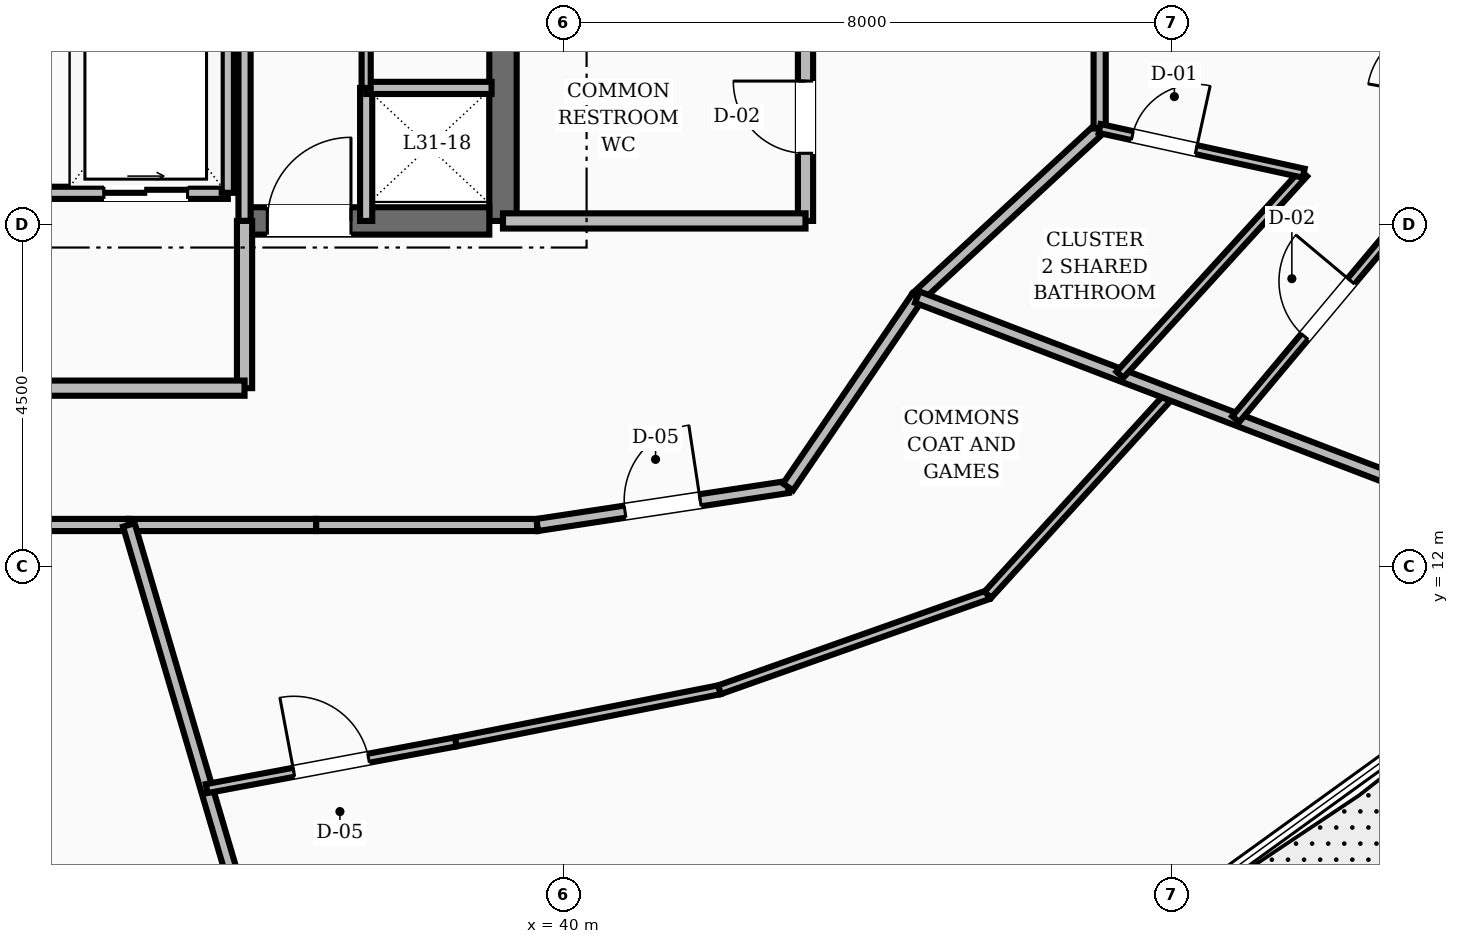
"""IFC4 building model, lengths in metres.
Left out: names, types, materials, properties, quantities, classifications, styles, units other than length and angle.
Written with IfcOpenShell. Run it as: python <this file> out.ifc"""

import sys

from ifc_helpers import new_model, si_unit, direction, frame, frame_2d, origin, place, context, subcontext, project, spatial, rectangle, extrude, element, fill, save


model = new_model("IFC4")
c1 = context("Model", 3, precision=1e-05, world=origin(), true_north=direction((0.0, 1.0)))
c2 = subcontext(c1, "Body", "Model", "MODEL_VIEW")
j1 = project(units=[si_unit("LENGTHUNIT", "METRE"), si_unit("PLANEANGLEUNIT", "RADIAN")], contexts=[c1])
p1 = place(None, origin())
s1 = spatial("IfcSite", under=j1, at=p1, CompositionType="ELEMENT")
p2 = place(p1, origin())
s2 = spatial("IfcBuilding", under=s1, at=p2, CompositionType="ELEMENT")
p3 = place(p2, frame((0.0, 0.0, 124.4)))
s3 = spatial("IfcBuildingStorey", under=s2, at=p3, CompositionType="ELEMENT", Elevation=124.4)
p4 = place(p3, frame((39.2, 16.55, 0.0), z_axis=(0.0, 0.0, 1.0), x_axis=(0.0, 1.0, 0.0)))
e1 = element("IfcWall", 1, at=p4, inside=s3, PredefinedType="SHEAR", context=c2, shape_type="SweptSolid", body=[
    extrude(rectangle(XDim=6.3, YDim=0.36, at=frame_2d((3.15, 0.0))), origin(), (0.0, 0.0, 1.0), 3.6),
])
p5 = place(p3, frame((35.8, 16.55, 0.0), z_axis=(0.0, 0.0, 1.0), x_axis=(1.0, 0.0, 0.0)))
e2 = element("IfcWall", 2, at=p5, inside=s3, PredefinedType="SHEAR", context=c2, shape_type="SweptSolid", body=[
    extrude(rectangle(XDim=3.22, YDim=0.36, at=frame_2d((1.61, 0.0))), origin(), (0.0, 0.0, 1.0), 3.6),
])
p6 = place(p5, frame((0.3, 0.0, 0.0)))
e3 = element("IfcOpeningElement", 3, at=p6, cuts=e2, PredefinedType="OPENING", context=c2, shape_type="SweptSolid", body=[
    extrude(rectangle(XDim=1.1, YDim=2.1, at=frame_2d((0.55, 1.05))), frame((0.0, 0.19, 0.0), z_axis=(0.0, -1.0, 0.0), x_axis=(1.0, 0.0, 0.0)), (0.0, 0.0, 1.0), 0.38),
])
p7 = place(p3, frame((43.18, 16.55, 0.0), z_axis=(0.0, 0.0, 1.0), x_axis=(0.0, 1.0, 0.0)))
e4 = element("IfcWall", 4, at=p7, inside=s3, PredefinedType="SOLIDWALL", context=c2, shape_type="SweptSolid", body=[
    extrude(rectangle(XDim=2.73, YDim=0.2, at=frame_2d((1.365, 0.0))), origin(), (0.0, 0.0, 1.0), 2.8),
])
p8 = place(p7, frame((0.89, 0.0, 0.0)))
e5 = element("IfcOpeningElement", 5, at=p8, cuts=e4, PredefinedType="OPENING", context=c2, shape_type="SweptSolid", body=[
    extrude(rectangle(XDim=0.95, YDim=2.1, at=frame_2d((0.475, 1.05))), frame((0.0, 0.11, 0.0), z_axis=(0.0, -1.0, 0.0), x_axis=(1.0, 0.0, 0.0)), (0.0, 0.0, 1.0), 0.22),
])
p9 = place(p3, frame((39.2, 16.55, 0.0), z_axis=(0.0, 0.0, 1.0), x_axis=(1.0, 0.0, 0.0)))
e6 = element("IfcWall", 6, at=p9, inside=s3, PredefinedType="SOLIDWALL", context=c2, shape_type="SweptSolid", body=[
    extrude(rectangle(XDim=3.98, YDim=0.2, at=frame_2d((1.99, 0.0))), origin(), (0.0, 0.0, 1.0), 2.8),
])
p10 = place(p3, frame((35.8, 16.55, 0.0), z_axis=(0.0, 0.0, 1.0), x_axis=(0.0, 1.0, 0.0)))
e7 = element("IfcWall", 7, at=p10, inside=s3, PredefinedType="SOLIDWALL", context=c2, shape_type="SweptSolid", body=[
    extrude(rectangle(XDim=3.3, YDim=0.16, at=frame_2d((1.65, 0.0))), origin(), (0.0, 0.0, 1.0), 2.8),
])
p11 = place(p3, frame((37.4, 16.55, 0.0), z_axis=(0.0, 0.0, 1.0), x_axis=(0.0, 1.0, 0.0)))
e8 = element("IfcWall", 8, at=p11, inside=s3, PredefinedType="SOLIDWALL", context=c2, shape_type="SweptSolid", body=[
    extrude(rectangle(XDim=1.75, YDim=0.16, at=frame_2d((0.875, 0.0))), origin(), (0.0, 0.0, 1.0), 2.8),
])
p12 = place(p3, frame((35.8, 14.35, 0.0), z_axis=(0.0, 0.0, 1.0), x_axis=(0.0, 1.0, 0.0)))
e9 = element("IfcWall", 9, at=p12, inside=s3, PredefinedType="SOLIDWALL", context=c2, shape_type="SweptSolid", body=[
    extrude(rectangle(XDim=2.2, YDim=0.2, at=frame_2d((1.1, 0.0))), origin(), (0.0, 0.0, 1.0), 2.8),
])
p13 = place(p3, frame((28.2, 14.35, 0.0), z_axis=(0.0, 0.0, 1.0), x_axis=(1.0, 0.0, 0.0)))
e10 = element("IfcWall", 10, at=p13, inside=s3, PredefinedType="SOLIDWALL", context=c2, shape_type="SweptSolid", body=[
    extrude(rectangle(XDim=7.6, YDim=0.2, at=frame_2d((3.8, 0.0))), origin(), (0.0, 0.0, 1.0), 2.8),
])
p14 = place(p13, frame((3.2, 0.0, 0.0)))
e11 = element("IfcOpeningElement", 11, at=p14, cuts=e10, PredefinedType="OPENING", context=c2, shape_type="SweptSolid", body=[
    extrude(rectangle(XDim=1.2, YDim=2.1, at=frame_2d((0.6, 1.05))), frame((0.0, 0.11, 0.0), z_axis=(0.0, -1.0, 0.0), x_axis=(1.0, 0.0, 0.0)), (0.0, 0.0, 1.0), 0.22),
])
p15 = place(p3, frame((28.42, 16.92, 0.0), z_axis=(0.0, 0.0, 1.0), x_axis=(1.0, 0.0, 0.0)))
e12 = element("IfcWall", 12, at=p15, inside=s3, PredefinedType="SOLIDWALL", context=c2, shape_type="SweptSolid", body=[
    extrude(rectangle(XDim=7.16, YDim=0.16, at=frame_2d((3.58, 0.0))), origin(), (0.0, 0.0, 1.0), 2.8),
])
p16 = place(p15, frame((0.53, 0.0, 0.0)))
e13 = element("IfcOpeningElement", 13, at=p16, cuts=e12, PredefinedType="OPENING", context=c2, shape_type="SweptSolid", body=[
    extrude(rectangle(XDim=1.1, YDim=2.15, at=frame_2d((0.55, 1.075))), frame((0.0, 0.09, 0.0), z_axis=(0.0, -1.0, 0.0), x_axis=(1.0, 0.0, 0.0)), (0.0, 0.0, 1.0), 0.18),
])
p17 = place(p15, frame((3.03, 0.0, 0.0)))
e14 = element("IfcOpeningElement", 14, at=p17, cuts=e12, PredefinedType="OPENING", context=c2, shape_type="SweptSolid", body=[
    extrude(rectangle(XDim=1.1, YDim=2.15, at=frame_2d((0.55, 1.075))), frame((0.0, 0.09, 0.0), z_axis=(0.0, -1.0, 0.0), x_axis=(1.0, 0.0, 0.0)), (0.0, 0.0, 1.0), 0.18),
])
p18 = place(p15, frame((5.53, 0.0, 0.0)))
e15 = element("IfcOpeningElement", 15, at=p18, cuts=e12, PredefinedType="OPENING", context=c2, shape_type="SweptSolid", body=[
    extrude(rectangle(XDim=1.1, YDim=2.15, at=frame_2d((0.55, 1.075))), frame((0.0, 0.09, 0.0), z_axis=(0.0, -1.0, 0.0), x_axis=(1.0, 0.0, 0.0)), (0.0, 0.0, 1.0), 0.18),
])
p19 = place(p3, frame((35.58, 16.92, 0.0), z_axis=(0.0, 0.0, 1.0), x_axis=(0.0, 1.0, 0.0)))
e16 = element("IfcWall", 16, at=p19, inside=s3, PredefinedType="SOLIDWALL", context=c2, shape_type="SweptSolid", body=[
    extrude(rectangle(XDim=2.76, YDim=0.16, at=frame_2d((1.38, 0.0))), origin(), (0.0, 0.0, 1.0), 2.8),
])
p20 = place(p3, frame((37.4, 18.3, 0.0), z_axis=(0.0, 0.0, 1.0), x_axis=(1.0, 0.0, 0.0)))
e17 = element("IfcWall", 17, at=p20, inside=s3, PredefinedType="SOLIDWALL", context=c2, shape_type="SweptSolid", body=[
    extrude(rectangle(XDim=1.65, YDim=0.16, at=frame_2d((0.825, 0.0))), origin(), (0.0, 0.0, 1.0), 2.8),
])
p21 = place(p3, frame((37.4, 18.3, 0.0), z_axis=(0.0, 0.0, 1.0), x_axis=(0.0, 1.0, 0.0)))
e18 = element("IfcWall", 18, at=p21, inside=s3, PredefinedType="PARTITIONING", context=c2, shape_type="SweptSolid", body=[
    extrude(rectangle(XDim=4.45, YDim=0.12, at=frame_2d((2.225, 0.0))), origin(), (0.0, 0.0, 1.0), 2.8),
])
p22 = place(p21, frame((1.75, 0.0, 0.0)))
e19 = element("IfcOpeningElement", 19, at=p22, cuts=e18, PredefinedType="OPENING", context=c2, shape_type="SweptSolid", body=[
    extrude(rectangle(XDim=0.95, YDim=2.1, at=frame_2d((0.475, 1.05))), frame((0.0, 0.07, 0.0), z_axis=(0.0, -1.0, 0.0), x_axis=(1.0, 0.0, 0.0)), (0.0, 0.0, 1.0), 0.14),
])
p23 = place(p3, frame((32.0, 12.55, 0.0), z_axis=(0.0, 0.0, 1.0), x_axis=(1.0, 0.0, 0.0)))
e20 = element("IfcWall", 20, at=p23, inside=s3, PredefinedType="SOLIDWALL", context=c2, shape_type="SweptSolid", body=[
    extrude(rectangle(XDim=2.278, YDim=0.16, at=frame_2d((1.139, 0.0))), origin(), (0.0, 0.0, 1.0), 2.8),
])
p24 = place(p3, frame((34.278, 12.55, 0.0), z_axis=(0.0, 0.0, 1.0), x_axis=(1.0, 0.0, 0.0)))
e21 = element("IfcWall", 21, at=p24, inside=s3, PredefinedType="SOLIDWALL", context=c2, shape_type="SweptSolid", body=[
    extrude(rectangle(XDim=2.465, YDim=0.16, at=frame_2d((1.232, 0.0))), origin(), (0.0, 0.0, 1.0), 2.8),
])
p25 = place(p3, frame((36.743, 12.55, 0.0), z_axis=(0.0, 0.0, 1.0), x_axis=(1.0, 0.0, 0.0)))
e22 = element("IfcWall", 22, at=p25, inside=s3, PredefinedType="SOLIDWALL", context=c2, shape_type="SweptSolid", body=[
    extrude(rectangle(XDim=2.908, YDim=0.16, at=frame_2d((1.454, 0.0))), origin(), (0.0, 0.0, 1.0), 2.8),
])
p26 = place(p3, frame((39.651, 12.55, 0.0), z_axis=(0.0, 0.0, 1.0), x_axis=(0.988710906508, 0.149835721217, 0.0)))
e23 = element("IfcWall", 23, at=p26, inside=s3, PredefinedType="SOLIDWALL", context=c2, shape_type="SweptSolid", body=[
    extrude(rectangle(XDim=3.337, YDim=0.16, at=frame_2d((1.668, 0.0))), origin(), (0.0, 0.0, 1.0), 2.8),
])
p27 = place(p26, frame((1.168, 0.0, 0.0)))
e24 = element("IfcOpeningElement", 24, at=p27, cuts=e23, PredefinedType="OPENING", context=c2, shape_type="SweptSolid", body=[
    extrude(rectangle(XDim=1.0, YDim=2.1, at=frame_2d((0.5, 1.05))), frame((0.0, 0.09, 0.0), z_axis=(0.0, -1.0, 0.0), x_axis=(1.0, 0.0, 0.0)), (0.0, 0.0, 1.0), 0.18),
])
p28 = place(p3, frame((42.95, 13.05, 0.0), z_axis=(0.0, 0.0, 1.0), x_axis=(0.562674669208, 0.826678423955, 0.0)))
e25 = element("IfcWall", 25, at=p28, inside=s3, PredefinedType="SOLIDWALL", context=c2, shape_type="SweptSolid", body=[
    extrude(rectangle(XDim=3.021, YDim=0.16, at=frame_2d((1.511, 0.0))), origin(), (0.0, 0.0, 1.0), 2.8),
])
p29 = place(p3, frame((44.65, 15.548, 0.0), z_axis=(0.0, 0.0, 1.0), x_axis=(0.734347936521, 0.678773237633, 0.0)))
e26 = element("IfcWall", 26, at=p29, inside=s3, PredefinedType="SOLIDWALL", context=c2, shape_type="SweptSolid", body=[
    extrude(rectangle(XDim=3.268, YDim=0.16, at=frame_2d((1.634, 0.0))), origin(), (0.0, 0.0, 1.0), 2.8),
])
p30 = place(p3, frame((47.05, 17.766, 0.0), z_axis=(0.0, 0.0, 1.0), x_axis=(0.0, 1.0, 0.0)))
e27 = element("IfcWall", 27, at=p30, inside=s3, PredefinedType="SOLIDWALL", context=c2, shape_type="SweptSolid", body=[
    extrude(rectangle(XDim=3.24, YDim=0.16, at=frame_2d((1.62, 0.0))), origin(), (0.0, 0.0, 1.0), 2.8),
])
p31 = place(p30, frame((1.12, 0.0, 0.0)))
e28 = element("IfcOpeningElement", 28, at=p31, cuts=e27, PredefinedType="OPENING", context=c2, shape_type="SweptSolid", body=[
    extrude(rectangle(XDim=1.0, YDim=2.1, at=frame_2d((0.5, 1.05))), frame((0.0, 0.09, 0.0), z_axis=(0.0, -1.0, 0.0), x_axis=(1.0, 0.0, 0.0)), (0.0, 0.0, 1.0), 0.18),
])
p32 = place(p3, frame((34.278, 12.55, 0.0), z_axis=(0.0, 0.0, 1.0), x_axis=(0.283064731291, -0.959100806954, 0.0)))
e29 = element("IfcWall", 29, at=p32, inside=s3, PredefinedType="SOLIDWALL", context=c2, shape_type="SweptSolid", body=[
    extrude(rectangle(XDim=10.283, YDim=0.16, at=frame_2d((5.141, 0.0))), origin(), (0.0, 0.0, 1.0), 2.8),
])
p33 = place(p3, frame((35.301, 9.082, 0.0), z_axis=(0.0, 0.0, 1.0), x_axis=(0.982868872263, 0.184306212419, 0.0)))
e30 = element("IfcWall", 30, at=p33, inside=s3, PredefinedType="PARTITIONING", context=c2, shape_type="SweptSolid", body=[
    extrude(rectangle(XDim=3.335, YDim=0.12, at=frame_2d((1.668, 0.0))), origin(), (0.0, 0.0, 1.0), 2.8),
])
p34 = place(p33, frame((1.168, 0.0, 0.0)))
e31 = element("IfcOpeningElement", 31, at=p34, cuts=e30, PredefinedType="OPENING", context=c2, shape_type="SweptSolid", body=[
    extrude(rectangle(XDim=1.0, YDim=2.1, at=frame_2d((0.5, 1.05))), frame((0.0, 0.07, 0.0), z_axis=(0.0, -1.0, 0.0), x_axis=(1.0, 0.0, 0.0)), (0.0, 0.0, 1.0), 0.14),
])
p35 = place(p3, frame((38.58, 9.696, 0.0), z_axis=(0.0, 0.0, 1.0), x_axis=(0.980995270945, 0.19403164274, 0.0)))
e32 = element("IfcWall", 32, at=p35, inside=s3, PredefinedType="PARTITIONING", context=c2, shape_type="SweptSolid", body=[
    extrude(rectangle(XDim=3.537, YDim=0.12, at=frame_2d((1.769, 0.0))), origin(), (0.0, 0.0, 1.0), 2.8),
])
p36 = place(p3, frame((42.049, 10.383, 0.0), z_axis=(0.0, 0.0, 1.0), x_axis=(0.942746880335, 0.333509099753, 0.0)))
e33 = element("IfcWall", 33, at=p36, inside=s3, PredefinedType="PARTITIONING", context=c2, shape_type="SweptSolid", body=[
    extrude(rectangle(XDim=3.744, YDim=0.12, at=frame_2d((1.872, 0.0))), origin(), (0.0, 0.0, 1.0), 2.8),
])
p37 = place(p3, frame((45.579, 11.631, 0.0), z_axis=(0.0, 0.0, 1.0), x_axis=(0.673346353961, 0.739327185762, 0.0)))
e34 = element("IfcWall", 34, at=p37, inside=s3, PredefinedType="PARTITIONING", context=c2, shape_type="SweptSolid", body=[
    extrude(rectangle(XDim=3.571, YDim=0.12, at=frame_2d((1.785, 0.0))), origin(), (0.0, 0.0, 1.0), 2.8),
])
p38 = place(p3, frame((44.65, 15.548, 0.0), z_axis=(0.0, 0.0, 1.0), x_axis=(0.933853161124, -0.35765664185, 0.0)))
e35 = element("IfcWall", 35, at=p38, inside=s3, PredefinedType="SOLIDWALL", context=c2, shape_type="SweptSolid", body=[
    extrude(rectangle(XDim=10.147, YDim=0.16, at=frame_2d((5.073, 0.0))), origin(), (0.0, 0.0, 1.0), 2.8),
])
p39 = place(p3, frame((47.316, 14.526, 0.0), z_axis=(0.0, 0.0, 1.0), x_axis=(0.673803025367, 0.738911011562, 0.0)))
e36 = element("IfcWall", 36, at=p39, inside=s3, PredefinedType="PARTITIONING", context=c2, shape_type="SweptSolid", body=[
    extrude(rectangle(XDim=3.589, YDim=0.12, at=frame_2d((1.794, 0.0))), origin(), (0.0, 0.0, 1.0), 2.8),
])
p40 = place(p3, frame((47.05, 17.766, 0.0), z_axis=(0.0, 0.0, 1.0), x_axis=(0.976828673368, -0.214022762541, 0.0)))
e37 = element("IfcWall", 37, at=p40, inside=s3, PredefinedType="PARTITIONING", context=c2, shape_type="SweptSolid", body=[
    extrude(rectangle(XDim=2.748, YDim=0.12, at=frame_2d((1.374, 0.0))), origin(), (0.0, 0.0, 1.0), 2.8),
])
p41 = place(p40, frame((0.44, 0.0, 0.0)))
e38 = element("IfcOpeningElement", 38, at=p41, cuts=e37, PredefinedType="OPENING", context=c2, shape_type="SweptSolid", body=[
    extrude(rectangle(XDim=0.86, YDim=2.1, at=frame_2d((0.43, 1.05))), frame((0.0, 0.07, 0.0), z_axis=(0.0, -1.0, 0.0), x_axis=(1.0, 0.0, 0.0)), (0.0, 0.0, 1.0), 0.14),
])
p42 = place(p3, frame((48.84, 13.943, 0.0), z_axis=(0.0, 0.0, 1.0), x_axis=(0.64212553746, 0.766599500483, 0.0)))
e39 = element("IfcWall", 39, at=p42, inside=s3, PredefinedType="PARTITIONING", context=c2, shape_type="SweptSolid", body=[
    extrude(rectangle(XDim=3.781, YDim=0.12, at=frame_2d((1.891, 0.0))), origin(), (0.0, 0.0, 1.0), 2.8),
])
p43 = place(p42, frame((1.416, 0.0, 0.0)))
e40 = element("IfcOpeningElement", 40, at=p43, cuts=e39, PredefinedType="OPENING", context=c2, shape_type="SweptSolid", body=[
    extrude(rectangle(XDim=0.95, YDim=2.1, at=frame_2d((0.475, 1.05))), frame((0.0, 0.07, 0.0), z_axis=(0.0, -1.0, 0.0), x_axis=(1.0, 0.0, 0.0)), (0.0, 0.0, 1.0), 0.14),
])
p44 = place(p8, origin())
e41 = element("IfcDoor", 41, at=p44, inside=s3, OperationType="SINGLE_SWING_RIGHT", PredefinedType="DOOR", context=c2, shape_type="SweptSolid", body=[
    extrude(rectangle(XDim=0.95, YDim=2.1, at=frame_2d((0.475, 1.05))), frame((0.0, 0.025, 0.0), z_axis=(0.0, -1.0, 0.0), x_axis=(1.0, 0.0, 0.0)), (0.0, 0.0, 1.0), 0.05),
])
fill(e5, e41)
p45 = place(p6, origin())
e42 = element("IfcDoor", 42, at=p45, inside=s3, OperationType="SINGLE_SWING_RIGHT", PredefinedType="DOOR", context=c2, shape_type="SweptSolid", body=[
    extrude(rectangle(XDim=1.1, YDim=2.1, at=frame_2d((0.55, 1.05))), frame((0.0, 0.025, 0.0), z_axis=(0.0, -1.0, 0.0), x_axis=(1.0, 0.0, 0.0)), (0.0, 0.0, 1.0), 0.05),
])
fill(e3, e42)
p46 = place(p18, origin())
e43 = element("IfcDoor", 43, at=p46, inside=s3, OperationType="SLIDING_TO_RIGHT", PredefinedType="DOOR", context=c2, shape_type="SweptSolid", body=[
    extrude(rectangle(XDim=1.1, YDim=2.15, at=frame_2d((0.55, 1.075))), frame((0.0, 0.025, 0.0), z_axis=(0.0, -1.0, 0.0), x_axis=(1.0, 0.0, 0.0)), (0.0, 0.0, 1.0), 0.05),
])
fill(e15, e43)
p47 = place(p27, origin())
e44 = element("IfcDoor", 44, at=p47, inside=s3, OperationType="SINGLE_SWING_RIGHT", PredefinedType="DOOR", context=c2, shape_type="SweptSolid", body=[
    extrude(rectangle(XDim=1.0, YDim=2.1, at=frame_2d((0.5, 1.05))), frame((0.0, 0.025, 0.0), z_axis=(0.0, -1.0, 0.0), x_axis=(1.0, 0.0, 0.0)), (0.0, 0.0, 1.0), 0.05),
])
fill(e24, e44)
p48 = place(p34, origin())
e45 = element("IfcDoor", 45, at=p48, inside=s3, OperationType="SINGLE_SWING_LEFT", PredefinedType="DOOR", context=c2, shape_type="SweptSolid", body=[
    extrude(rectangle(XDim=1.0, YDim=2.1, at=frame_2d((0.5, 1.05))), frame((0.0, 0.025, 0.0), z_axis=(0.0, -1.0, 0.0), x_axis=(1.0, 0.0, 0.0)), (0.0, 0.0, 1.0), 0.05),
])
fill(e31, e45)
p49 = place(p41, origin())
e46 = element("IfcDoor", 46, at=p49, inside=s3, OperationType="SINGLE_SWING_RIGHT", PredefinedType="DOOR", context=c2, shape_type="SweptSolid", body=[
    extrude(rectangle(XDim=0.86, YDim=2.1, at=frame_2d((0.43, 1.05))), frame((0.0, 0.025, 0.0), z_axis=(0.0, -1.0, 0.0), x_axis=(1.0, 0.0, 0.0)), (0.0, 0.0, 1.0), 0.05),
])
fill(e38, e46)
p50 = place(p43, origin())
e47 = element("IfcDoor", 47, at=p50, inside=s3, OperationType="SINGLE_SWING_RIGHT", PredefinedType="DOOR", context=c2, shape_type="SweptSolid", body=[
    extrude(rectangle(XDim=0.95, YDim=2.1, at=frame_2d((0.475, 1.05))), frame((0.0, 0.025, 0.0), z_axis=(0.0, -1.0, 0.0), x_axis=(1.0, 0.0, 0.0)), (0.0, 0.0, 1.0), 0.05),
])
fill(e40, e47)
save(model, sys.argv[1])
